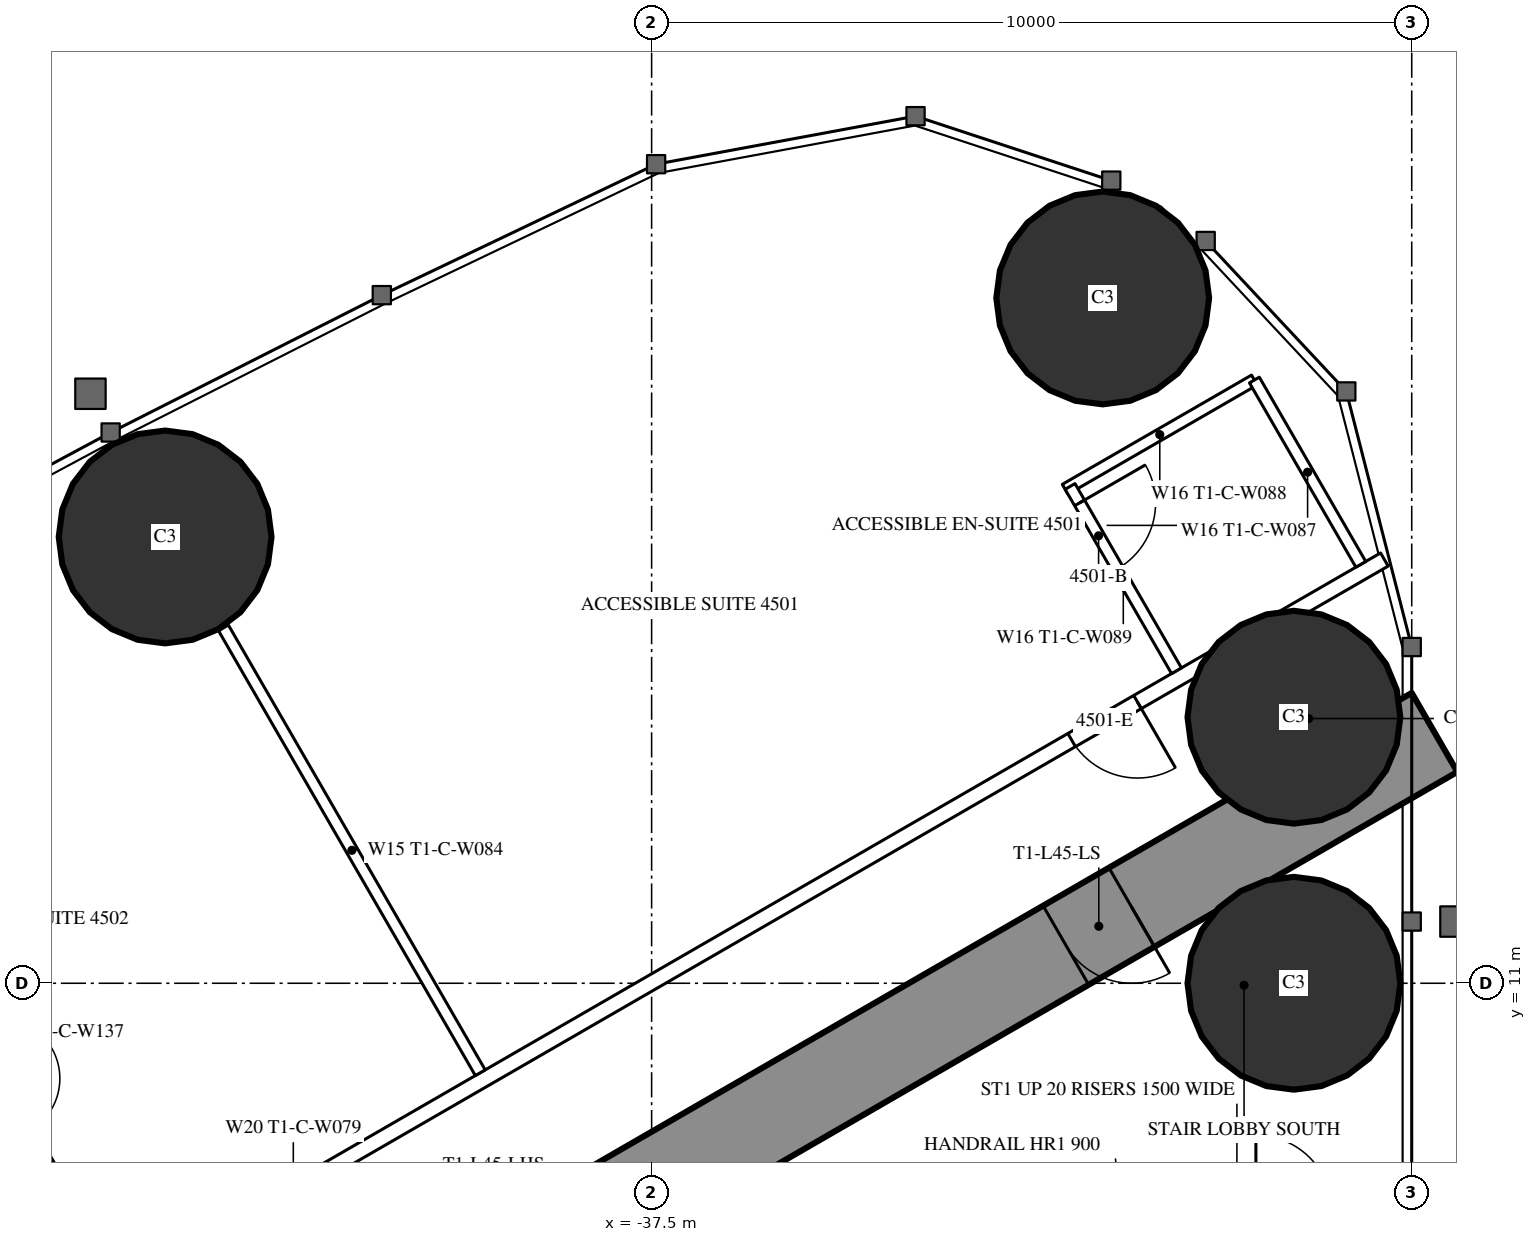
"""IFC4 building model, lengths in metres.
Left out: names, types, materials, properties, quantities, classifications, styles, units other than length and angle.
Written with IfcOpenShell. Run it as: python <this file> out.ifc"""

import sys

from ifc_helpers import new_model, si_unit, direction, frame, frame_2d, origin, origin_2d, place, context, subcontext, project, spatial, rectangle, circle, extrude, element, fill, save


model = new_model("IFC4")
c1 = context("Model", 3, precision=1e-05, world=origin(), true_north=direction((0.0, 1.0)))
c2 = subcontext(c1, "Body", "Model", "MODEL_VIEW")
j1 = project(units=[si_unit("LENGTHUNIT", "METRE"), si_unit("PLANEANGLEUNIT", "RADIAN")], contexts=[c1])
p1 = place(None, origin())
s1 = spatial("IfcSite", under=j1, at=p1, CompositionType="ELEMENT")
p2 = place(p1, origin())
s2 = spatial("IfcBuilding", under=s1, at=p2, CompositionType="ELEMENT")
p3 = place(p2, frame((0.0, 0.0, 170.3)))
s3 = spatial("IfcBuildingStorey", under=s2, at=p3, CompositionType="ELEMENT", Elevation=170.3)
for number, where, z_axis, x_axis in (
    (1, (-31.565, 20.016, 0.0), (0.0, 0.0, 1.0), (1.0, 0.0, 0.0)),
    (2, (-29.05, 11.0, 0.0), (0.0, 0.0, 1.0), (1.0, 0.0, 0.0)),
    (3, (-29.05, 14.5, 0.0), (0.0, 0.0, 1.0), (1.0, 0.0, 0.0)),
    (4, (-43.9, 16.871, 0.0), (0.0, 0.0, 1.0), (1.0, 0.0, 0.0)),
):
    element("IfcColumn", number, at=place(p3, frame(where, z_axis=z_axis, x_axis=x_axis)), inside=s3, PredefinedType="COLUMN", context=c2, shape_type="SweptSolid", body=[
        extrude(circle(Radius=1.4, at=origin_2d()), origin(), (0.0, 0.0, 1.0), 3.5),
    ])
p4 = place(p3, frame((-27.2, 14.3, 0.0), z_axis=(0.0, 0.0, 1.0), x_axis=(-0.866026593062, -0.499997940104, 0.0)))
e5 = element("IfcWall", 5, at=p4, inside=s3, PredefinedType="SHEAR", context=c2, shape_type="SweptSolid", body=[
    extrude(rectangle(XDim=28.946, YDim=1.2, at=frame_2d((14.473, 0.0))), origin(), (0.0, 0.0, 1.0), 3.5),
])
p5 = place(p4, frame((4.6, 0.0, 0.0)))
e6 = element("IfcOpeningElement", 6, at=p5, cuts=e5, PredefinedType="OPENING", context=c2, shape_type="SweptSolid", body=[
    extrude(rectangle(XDim=1.0, YDim=2.2, at=frame_2d((0.5, 1.1))), frame((0.0, 0.61, 0.0), z_axis=(0.0, -1.0, 0.0), x_axis=(1.0, 0.0, 0.0)), (0.0, 0.0, 1.0), 1.22),
])
p6 = place(p4, frame((13.395, 0.0, 0.0)))
e7 = element("IfcOpeningElement", 7, at=p6, cuts=e5, PredefinedType="OPENING", context=c2, shape_type="SweptSolid", body=[
    extrude(rectangle(XDim=1.8, YDim=2.2, at=frame_2d((0.9, 1.1))), frame((0.0, 0.61, 0.0), z_axis=(0.0, -1.0, 0.0), x_axis=(1.0, 0.0, 0.0)), (0.0, 0.0, 1.0), 1.22),
])
p7 = place(p3, frame((-27.86, 16.575, 0.0), z_axis=(0.0, 0.0, 1.0), x_axis=(-0.866025533911, -0.499999774615, 0.0)))
e8 = element("IfcWall", 8, at=p7, inside=s3, PredefinedType="PARTITIONING", context=c2, shape_type="SweptSolid", body=[
    extrude(rectangle(XDim=33.149, YDim=0.2, at=frame_2d((16.575, 0.0))), origin(), (0.0, 0.0, 1.0), 3.25),
])
p8 = place(p7, frame((3.75, 0.0, 0.0)))
e9 = element("IfcOpeningElement", 9, at=p8, cuts=e8, PredefinedType="OPENING", context=c2, shape_type="SweptSolid", body=[
    extrude(rectangle(XDim=1.0, YDim=2.2, at=frame_2d((0.5, 1.1))), frame((0.0, 0.11, 0.0), z_axis=(0.0, -1.0, 0.0), x_axis=(1.0, 0.0, 0.0)), (0.0, 0.0, 1.0), 0.22),
])
p9 = place(p7, frame((20.347, 0.0, 0.0)))
e10 = element("IfcOpeningElement", 10, at=p9, cuts=e8, PredefinedType="OPENING", context=c2, shape_type="SweptSolid", body=[
    extrude(rectangle(XDim=0.95, YDim=2.2, at=frame_2d((0.475, 1.1))), frame((0.0, 0.11, 0.0), z_axis=(0.0, -1.0, 0.0), x_axis=(1.0, 0.0, 0.0)), (0.0, 0.0, 1.0), 0.22),
])
p10 = place(p7, frame((24.397, 0.0, 0.0)))
e11 = element("IfcOpeningElement", 11, at=p10, cuts=e8, PredefinedType="OPENING", context=c2, shape_type="SweptSolid", body=[
    extrude(rectangle(XDim=0.95, YDim=2.2, at=frame_2d((0.475, 1.1))), frame((0.0, 0.11, 0.0), z_axis=(0.0, -1.0, 0.0), x_axis=(1.0, 0.0, 0.0)), (0.0, 0.0, 1.0), 0.22),
])
p11 = place(p7, frame((30.042, 0.0, 0.0)))
e12 = element("IfcOpeningElement", 12, at=p11, cuts=e8, PredefinedType="OPENING", context=c2, shape_type="SweptSolid", body=[
    extrude(rectangle(XDim=0.95, YDim=2.2, at=frame_2d((0.475, 1.1))), frame((0.0, 0.11, 0.0), z_axis=(0.0, -1.0, 0.0), x_axis=(1.0, 0.0, 0.0)), (0.0, 0.0, 1.0), 0.22),
])
p12 = place(p3, frame((-39.754, 9.823, 0.0), z_axis=(0.0, 0.0, 1.0), x_axis=(-0.499997670926, 0.866026748472, 0.0)))
e13 = element("IfcWall", 13, at=p12, inside=s3, PredefinedType="PARTITIONING", context=c2, shape_type="SweptSolid", body=[
    extrude(rectangle(XDim=6.757, YDim=0.15, at=frame_2d((3.379, 0.0))), origin(), (0.0, 0.0, 1.0), 2.3),
])
p13 = place(p3, frame((-29.57, 18.936, 0.0), z_axis=(0.0, 0.0, 1.0), x_axis=(-0.866018712932, -0.500011588718, 0.0)))
e14 = element("IfcWall", 14, at=p13, inside=s3, PredefinedType="PARTITIONING", context=c2, shape_type="SweptSolid", body=[
    extrude(rectangle(XDim=2.875, YDim=0.15, at=frame_2d((1.438, 0.0))), origin(), (0.0, 0.0, 1.0), 3.25),
])
p14 = place(p3, frame((-30.595, 15.111, 0.0), z_axis=(0.0, 0.0, 1.0), x_axis=(-0.49998411664, 0.866034573852, 0.0)))
e15 = element("IfcWall", 15, at=p14, inside=s3, PredefinedType="PARTITIONING", context=c2, shape_type="SweptSolid", body=[
    extrude(rectangle(XDim=2.8, YDim=0.15, at=frame_2d((1.4, 0.0))), origin(), (0.0, 0.0, 1.0), 3.25),
])
p15 = place(p14, frame((1.55, 0.0, 0.0)))
e16 = element("IfcOpeningElement", 16, at=p15, cuts=e15, PredefinedType="OPENING", context=c2, shape_type="SweptSolid", body=[
    extrude(rectangle(XDim=1.0, YDim=2.2, at=frame_2d((0.5, 1.1))), frame((0.0, 0.085, 0.0), z_axis=(0.0, -1.0, 0.0), x_axis=(1.0, 0.0, 0.0)), (0.0, 0.0, 1.0), 0.17),
])
p16 = place(p3, frame((-28.17, 16.511, 0.0), z_axis=(0.0, 0.0, 1.0), x_axis=(-0.49994636267, 0.866056369097, 0.0)))
e17 = element("IfcWall", 17, at=p16, inside=s3, PredefinedType="PARTITIONING", context=c2, shape_type="SweptSolid", body=[
    extrude(rectangle(XDim=2.8, YDim=0.15, at=frame_2d((1.4, 0.0))), origin(), (0.0, 0.0, 1.0), 3.25),
])
p17 = place(p3, frame((-45.235, 8.275, 0.0), z_axis=(0.0, 0.0, 1.0), x_axis=(-0.500006934395, 0.866021400173, 0.0)))
e18 = element("IfcWall", 18, at=p17, inside=s3, PredefinedType="PARTITIONING", context=c2, shape_type="SweptSolid", body=[
    extrude(rectangle(XDim=2.6, YDim=0.15, at=frame_2d((1.3, 0.0))), origin(), (0.0, 0.0, 1.0), 3.25),
])
p18 = place(p17, frame((0.9, 0.0, 0.0)))
e19 = element("IfcOpeningElement", 19, at=p18, cuts=e18, PredefinedType="OPENING", context=c2, shape_type="SweptSolid", body=[
    extrude(rectangle(XDim=0.8, YDim=2.2, at=frame_2d((0.4, 1.1))), frame((0.0, 0.085, 0.0), z_axis=(0.0, -1.0, 0.0), x_axis=(1.0, 0.0, 0.0)), (0.0, 0.0, 1.0), 0.17),
])
p19 = place(p15, origin())
e20 = element("IfcDoor", 20, at=p19, inside=s3, OperationType="SINGLE_SWING_RIGHT", PredefinedType="DOOR", context=c2, shape_type="SweptSolid", body=[
    extrude(rectangle(XDim=1.0, YDim=2.2, at=frame_2d((0.5, 1.1))), frame((0.0, 0.025, 0.0), z_axis=(0.0, -1.0, 0.0), x_axis=(1.0, 0.0, 0.0)), (0.0, 0.0, 1.0), 0.05),
])
fill(e16, e20)
p20 = place(p8, origin())
e21 = element("IfcDoor", 21, at=p20, inside=s3, OperationType="SINGLE_SWING_LEFT", PredefinedType="DOOR", context=c2, shape_type="SweptSolid", body=[
    extrude(rectangle(XDim=1.0, YDim=2.2, at=frame_2d((0.5, 1.1))), frame((0.0, 0.025, 0.0), z_axis=(0.0, -1.0, 0.0), x_axis=(1.0, 0.0, 0.0)), (0.0, 0.0, 1.0), 0.05),
])
fill(e9, e21)
p21 = place(p5, origin())
e22 = element("IfcDoor", 22, at=p21, inside=s3, OperationType="SINGLE_SWING_LEFT", PredefinedType="DOOR", context=c2, shape_type="SweptSolid", body=[
    extrude(rectangle(XDim=1.0, YDim=2.2, at=frame_2d((0.5, 1.1))), frame((0.0, 0.025, 0.0), z_axis=(0.0, -1.0, 0.0), x_axis=(1.0, 0.0, 0.0)), (0.0, 0.0, 1.0), 0.05),
])
fill(e6, e22)
save(model, sys.argv[1])
